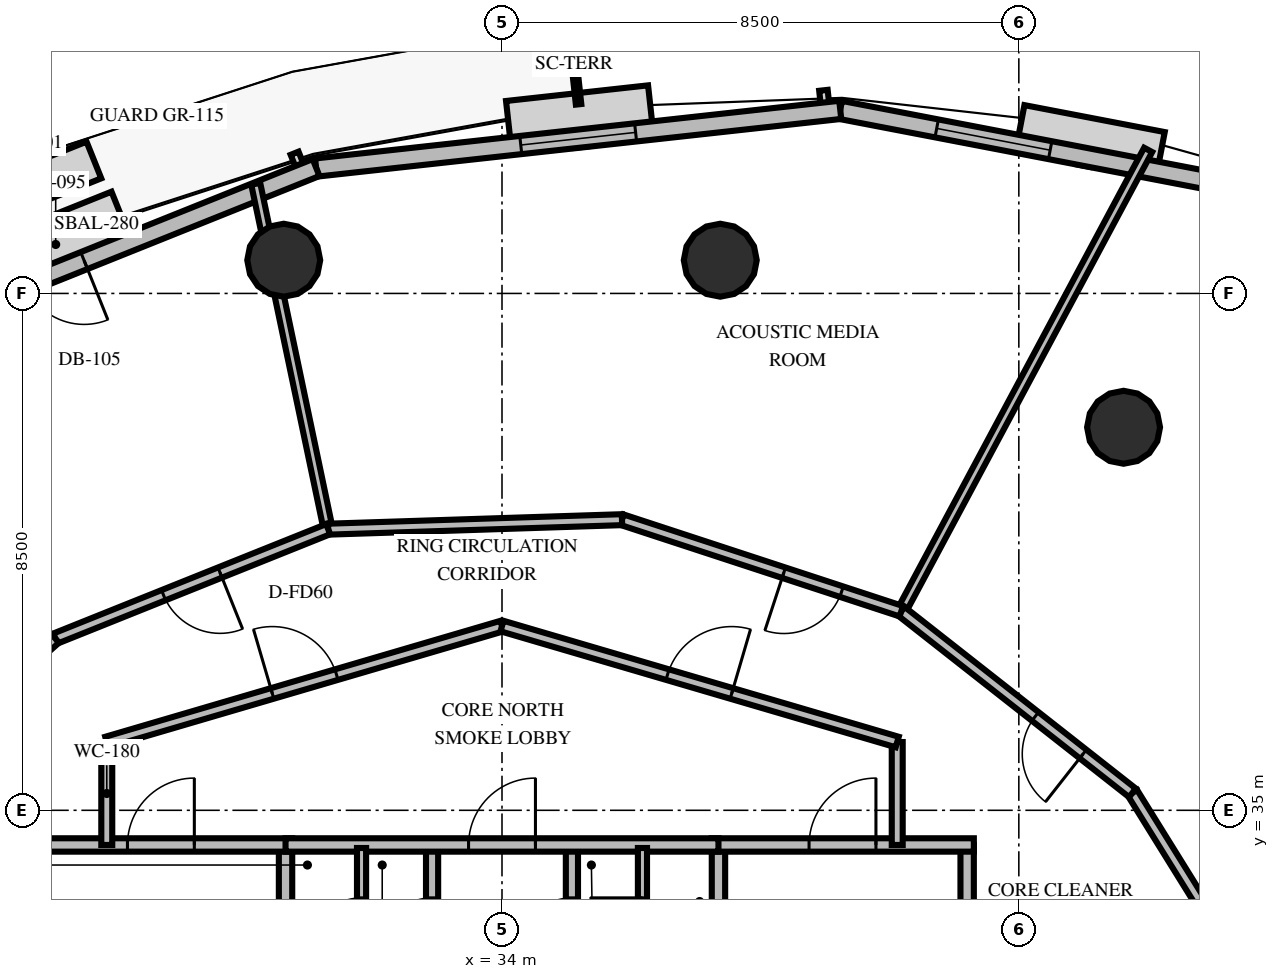
"""IFC4 building model, lengths in metres.
Left out: names, types, materials, properties, quantities, classifications, styles, units other than length and angle.
Written with IfcOpenShell. Run it as: python <this file> out.ifc"""

import sys

from ifc_helpers import new_model, si_unit, direction, frame, frame_2d, origin, origin_2d, place, context, subcontext, project, spatial, rectangle, circle, extrude, element, fill, save


model = new_model("IFC4")
c1 = context("Model", 3, precision=1e-05, world=origin(), true_north=direction((0.0, 1.0)))
c2 = subcontext(c1, "Body", "Model", "MODEL_VIEW")
j1 = project(units=[si_unit("LENGTHUNIT", "METRE"), si_unit("PLANEANGLEUNIT", "RADIAN")], contexts=[c1])
p1 = place(None, origin())
s1 = spatial("IfcSite", under=j1, at=p1, CompositionType="ELEMENT")
p2 = place(p1, origin())
s2 = spatial("IfcBuilding", under=s1, at=p2, CompositionType="ELEMENT")
p3 = place(p2, frame((0.0, 0.0, 125.8)))
s3 = spatial("IfcBuildingStorey", under=s2, at=p3, CompositionType="ELEMENT", Elevation=125.8)
for number, where, z_axis, x_axis in (
    (1, (44.222, 41.299, 0.0), (0.0, 0.0, 1.0), (1.0, 0.0, 0.0)),
    (2, (37.59, 44.046, 0.0), (0.0, 0.0, 1.0), (1.0, 0.0, 0.0)),
    (3, (30.41, 44.046, 0.0), (0.0, 0.0, 1.0), (1.0, 0.0, 0.0)),
):
    element("IfcColumn", number, at=place(p3, frame(where, z_axis=z_axis, x_axis=x_axis)), inside=s3, PredefinedType="COLUMN", context=c2, shape_type="SweptSolid", body=[
        extrude(circle(Radius=0.6, at=origin_2d()), origin(), (0.0, 0.0, 1.0), 4.0),
    ])
p4 = place(p3, frame((47.513, 44.992, 0.0), z_axis=(0.0, 0.0, 1.0), x_axis=(-0.982062977667, 0.188553196461, 0.0)))
e4 = element("IfcWall", 4, at=p4, inside=s3, PredefinedType="SOLIDWALL", context=c2, shape_type="SweptSolid", body=[
    extrude(rectangle(XDim=8.095, YDim=0.3, at=frame_2d((4.048, 0.0))), origin(), (0.0, 0.0, 1.0), 2.9),
])
p5 = place(p4, frame((4.58, 0.0, 0.8)))
e5 = element("IfcOpeningElement", 5, at=p5, cuts=e4, PredefinedType="OPENING", context=c2, shape_type="SweptSolid", body=[
    extrude(rectangle(XDim=1.9, YDim=1.95, at=frame_2d((0.95, 0.975))), frame((0.0, 0.16, 0.0), z_axis=(0.0, -1.0, 0.0), x_axis=(1.0, 0.0, 0.0)), (0.0, 0.0, 1.0), 0.32),
])
p6 = place(p3, frame((39.563, 46.519, 0.0), z_axis=(0.0, 0.0, 1.0), x_axis=(-0.99400193871, -0.109362451697, 0.0)))
e6 = element("IfcWall", 6, at=p6, inside=s3, PredefinedType="SOLIDWALL", context=c2, shape_type="SweptSolid", body=[
    extrude(rectangle(XDim=8.673, YDim=0.3, at=frame_2d((4.336, 0.0))), origin(), (0.0, 0.0, 1.0), 2.9),
])
p7 = place(p6, frame((3.386, 0.0, 0.8)))
e7 = element("IfcOpeningElement", 7, at=p7, cuts=e6, PredefinedType="OPENING", context=c2, shape_type="SweptSolid", body=[
    extrude(rectangle(XDim=1.9, YDim=1.95, at=frame_2d((0.95, 0.975))), frame((0.0, 0.16, 0.0), z_axis=(0.0, -1.0, 0.0), x_axis=(1.0, 0.0, 0.0)), (0.0, 0.0, 1.0), 0.32),
])
p8 = place(p3, frame((30.942, 45.57, 0.0), z_axis=(0.0, 0.0, 1.0), x_axis=(-0.928154394982, -0.372195404426, 0.0)))
e8 = element("IfcWall", 8, at=p8, inside=s3, PredefinedType="SOLIDWALL", context=c2, shape_type="SweptSolid", body=[
    extrude(rectangle(XDim=8.891, YDim=0.3, at=frame_2d((4.445, 0.0))), origin(), (0.0, 0.0, 1.0), 2.9),
])
p9 = place(p8, frame((4.11, 0.0, 0.0)))
e9 = element("IfcOpeningElement", 9, at=p9, cuts=e8, PredefinedType="OPENING", context=c2, shape_type="SweptSolid", body=[
    extrude(rectangle(XDim=1.05, YDim=2.15, at=frame_2d((0.525, 1.075))), frame((0.0, 0.16, 0.0), z_axis=(0.0, -1.0, 0.0), x_axis=(1.0, 0.0, 0.0)), (0.0, 0.0, 1.0), 0.32),
])
p10 = place(p3, frame((30.44, 30.05, 0.0), z_axis=(0.0, 0.0, 1.0), x_axis=(0.0, 1.0, 0.0)))
e10 = element("IfcWall", 10, at=p10, inside=s3, PredefinedType="SOLIDWALL", context=c2, shape_type="SweptSolid", body=[
    extrude(rectangle(XDim=4.38, YDim=0.22, at=frame_2d((2.19, 0.0))), origin(), (0.0, 0.0, 1.0), 2.8),
])
p11 = place(p10, frame((0.8, 0.0, 0.0)))
e11 = element("IfcOpeningElement", 11, at=p11, cuts=e10, PredefinedType="OPENING", context=c2, shape_type="SweptSolid", body=[
    extrude(rectangle(XDim=1.05, YDim=2.1, at=frame_2d((0.525, 1.05))), frame((0.0, 0.12, 0.0), z_axis=(0.0, -1.0, 0.0), x_axis=(1.0, 0.0, 0.0)), (0.0, 0.0, 1.0), 0.24),
])
p12 = place(p3, frame((26.24, 34.43, 0.0), z_axis=(0.0, 0.0, 1.0), x_axis=(1.0, 0.0, 0.0)))
e12 = element("IfcWall", 12, at=p12, inside=s3, PredefinedType="SOLIDWALL", context=c2, shape_type="SweptSolid", body=[
    extrude(rectangle(XDim=4.31, YDim=0.22, at=frame_2d((2.155, 0.0))), origin(), (0.0, 0.0, 1.0), 2.8),
])
p13 = place(p12, frame((1.6, 0.0, 0.0)))
e13 = element("IfcOpeningElement", 13, at=p13, cuts=e12, PredefinedType="OPENING", context=c2, shape_type="SweptSolid", body=[
    extrude(rectangle(XDim=1.1, YDim=2.15, at=frame_2d((0.55, 1.075))), frame((0.0, 0.12, 0.0), z_axis=(0.0, -1.0, 0.0), x_axis=(1.0, 0.0, 0.0)), (0.0, 0.0, 1.0), 0.24),
])
p14 = place(p3, frame((32.85, 30.05, 0.0), z_axis=(0.0, 0.0, 1.0), x_axis=(0.0, 1.0, 0.0)))
e14 = element("IfcWall", 14, at=p14, inside=s3, PredefinedType="SOLIDWALL", context=c2, shape_type="SweptSolid", body=[
    extrude(rectangle(XDim=4.38, YDim=0.2, at=frame_2d((2.19, 0.0))), origin(), (0.0, 0.0, 1.0), 2.8),
])
p15 = place(p14, frame((2.65, 0.0, 0.0)))
e15 = element("IfcOpeningElement", 15, at=p15, cuts=e14, PredefinedType="OPENING", context=c2, shape_type="SweptSolid", body=[
    extrude(rectangle(XDim=0.86, YDim=2.05, at=frame_2d((0.43, 1.025))), frame((0.0, 0.11, 0.0), z_axis=(0.0, -1.0, 0.0), x_axis=(1.0, 0.0, 0.0)), (0.0, 0.0, 1.0), 0.22),
])
p16 = place(p3, frame((37.56, 30.05, 0.0), z_axis=(0.0, 0.0, 1.0), x_axis=(0.0, 1.0, 0.0)))
e16 = element("IfcWall", 16, at=p16, inside=s3, PredefinedType="SOLIDWALL", context=c2, shape_type="SweptSolid", body=[
    extrude(rectangle(XDim=4.38, YDim=0.22, at=frame_2d((2.19, 0.0))), origin(), (0.0, 0.0, 1.0), 2.8),
])
p17 = place(p16, frame((0.8, 0.0, 0.0)))
e17 = element("IfcOpeningElement", 17, at=p17, cuts=e16, PredefinedType="OPENING", context=c2, shape_type="SweptSolid", body=[
    extrude(rectangle(XDim=1.05, YDim=2.1, at=frame_2d((0.525, 1.05))), frame((0.0, 0.12, 0.0), z_axis=(0.0, -1.0, 0.0), x_axis=(1.0, 0.0, 0.0)), (0.0, 0.0, 1.0), 0.24),
])
p18 = place(p3, frame((41.65, 30.05, 0.0), z_axis=(0.0, 0.0, 1.0), x_axis=(0.0, 1.0, 0.0)))
e18 = element("IfcWall", 18, at=p18, inside=s3, PredefinedType="SOLIDWALL", context=c2, shape_type="SweptSolid", body=[
    extrude(rectangle(XDim=4.38, YDim=0.22, at=frame_2d((2.19, 0.0))), origin(), (0.0, 0.0, 1.0), 2.8),
])
p19 = place(p3, frame((37.45, 34.43, 0.0), z_axis=(0.0, 0.0, 1.0), x_axis=(1.0, 0.0, 0.0)))
e19 = element("IfcWall", 19, at=p19, inside=s3, PredefinedType="SOLIDWALL", context=c2, shape_type="SweptSolid", body=[
    extrude(rectangle(XDim=4.31, YDim=0.22, at=frame_2d((2.155, 0.0))), origin(), (0.0, 0.0, 1.0), 2.8),
])
p20 = place(p19, frame((1.6, 0.0, 0.0)))
e20 = element("IfcOpeningElement", 20, at=p20, cuts=e19, PredefinedType="OPENING", context=c2, shape_type="SweptSolid", body=[
    extrude(rectangle(XDim=1.1, YDim=2.15, at=frame_2d((0.55, 1.075))), frame((0.0, 0.12, 0.0), z_axis=(0.0, -1.0, 0.0), x_axis=(1.0, 0.0, 0.0)), (0.0, 0.0, 1.0), 0.24),
])
p21 = place(p3, frame((35.15, 30.05, 0.0), z_axis=(0.0, 0.0, 1.0), x_axis=(0.0, 1.0, 0.0)))
e21 = element("IfcWall", 21, at=p21, inside=s3, PredefinedType="SOLIDWALL", context=c2, shape_type="SweptSolid", body=[
    extrude(rectangle(XDim=4.38, YDim=0.2, at=frame_2d((2.19, 0.0))), origin(), (0.0, 0.0, 1.0), 2.8),
])
p22 = place(p21, frame((2.65, 0.0, 0.0)))
e22 = element("IfcOpeningElement", 22, at=p22, cuts=e21, PredefinedType="OPENING", context=c2, shape_type="SweptSolid", body=[
    extrude(rectangle(XDim=0.86, YDim=2.05, at=frame_2d((0.43, 1.025))), frame((0.0, 0.11, 0.0), z_axis=(0.0, -1.0, 0.0), x_axis=(1.0, 0.0, 0.0)), (0.0, 0.0, 1.0), 0.22),
])
p23 = place(p3, frame((30.44, 34.43, 0.0), z_axis=(0.0, 0.0, 1.0), x_axis=(1.0, 0.0, 0.0)))
e23 = element("IfcWall", 23, at=p23, inside=s3, PredefinedType="SOLIDWALL", context=c2, shape_type="SweptSolid", body=[
    extrude(rectangle(XDim=7.12, YDim=0.22, at=frame_2d((3.56, 0.0))), origin(), (0.0, 0.0, 1.0), 2.8),
])
p24 = place(p23, frame((3.01, 0.0, 0.0)))
e24 = element("IfcOpeningElement", 24, at=p24, cuts=e23, PredefinedType="OPENING", context=c2, shape_type="SweptSolid", body=[
    extrude(rectangle(XDim=1.1, YDim=2.15, at=frame_2d((0.55, 1.075))), frame((0.0, 0.12, 0.0), z_axis=(0.0, -1.0, 0.0), x_axis=(1.0, 0.0, 0.0)), (0.0, 0.0, 1.0), 0.24),
])
p25 = place(p3, frame((31.69, 32.05, 0.0), z_axis=(0.0, 0.0, 1.0), x_axis=(0.0, 1.0, 0.0)))
e25 = element("IfcWall", 25, at=p25, inside=s3, PredefinedType="PARTITIONING", context=c2, shape_type="SweptSolid", body=[
    extrude(rectangle(XDim=2.33, YDim=0.15, at=frame_2d((1.165, 0.0))), origin(), (0.0, 0.0, 1.0), 2.8),
])
p26 = place(p25, frame((0.65, 0.0, 0.0)))
e26 = element("IfcOpeningElement", 26, at=p26, cuts=e25, PredefinedType="OPENING", context=c2, shape_type="SweptSolid", body=[
    extrude(rectangle(XDim=0.86, YDim=2.05, at=frame_2d((0.43, 1.025))), frame((0.0, 0.085, 0.0), z_axis=(0.0, -1.0, 0.0), x_axis=(1.0, 0.0, 0.0)), (0.0, 0.0, 1.0), 0.17),
])
p27 = place(p3, frame((36.31, 32.05, 0.0), z_axis=(0.0, 0.0, 1.0), x_axis=(0.0, 1.0, 0.0)))
e27 = element("IfcWall", 27, at=p27, inside=s3, PredefinedType="PARTITIONING", context=c2, shape_type="SweptSolid", body=[
    extrude(rectangle(XDim=2.33, YDim=0.15, at=frame_2d((1.165, 0.0))), origin(), (0.0, 0.0, 1.0), 2.8),
])
p28 = place(p27, frame((0.65, 0.0, 0.0)))
e28 = element("IfcOpeningElement", 28, at=p28, cuts=e27, PredefinedType="OPENING", context=c2, shape_type="SweptSolid", body=[
    extrude(rectangle(XDim=0.86, YDim=2.05, at=frame_2d((0.43, 1.025))), frame((0.0, 0.085, 0.0), z_axis=(0.0, -1.0, 0.0), x_axis=(1.0, 0.0, 0.0)), (0.0, 0.0, 1.0), 0.17),
])
for number, where, z_axis, x_axis in (
    (29, (27.5, 34.43, 0.0), (0.0, 0.0, 1.0), (0.0, 1.0, 0.0)),
    (30, (40.5, 36.123, 0.0), (0.0, 0.0, 1.0), (0.0, -1.0, 0.0)),
):
    element("IfcWall", number, at=place(p3, frame(where, z_axis=z_axis, x_axis=x_axis)), inside=s3, PredefinedType="PARTITIONING", context=c2, shape_type="SweptSolid", body=[
        extrude(rectangle(XDim=1.693, YDim=0.18, at=frame_2d((0.846, 0.0))), origin(), (0.0, 0.0, 1.0), 2.8),
    ])
p29 = place(p3, frame((27.5, 36.123, 0.0), z_axis=(0.0, 0.0, 1.0), x_axis=(0.959546654541, 0.281549671923, 0.0)))
e31 = element("IfcWall", 31, at=p29, inside=s3, PredefinedType="PARTITIONING", context=c2, shape_type="SweptSolid", body=[
    extrude(rectangle(XDim=6.774, YDim=0.18, at=frame_2d((3.387, 0.0))), origin(), (0.0, 0.0, 1.0), 2.8),
])
p30 = place(p29, frame((2.837, 0.0, 0.0)))
e32 = element("IfcOpeningElement", 32, at=p30, cuts=e31, PredefinedType="OPENING", context=c2, shape_type="SweptSolid", body=[
    extrude(rectangle(XDim=1.1, YDim=2.15, at=frame_2d((0.55, 1.075))), frame((0.0, 0.1, 0.0), z_axis=(0.0, -1.0, 0.0), x_axis=(1.0, 0.0, 0.0)), (0.0, 0.0, 1.0), 0.2),
])
p31 = place(p3, frame((34.0, 38.03, 0.0), z_axis=(0.0, 0.0, 1.0), x_axis=(0.959546654541, -0.281549671923, 0.0)))
e33 = element("IfcWall", 33, at=p31, inside=s3, PredefinedType="PARTITIONING", context=c2, shape_type="SweptSolid", body=[
    extrude(rectangle(XDim=6.774, YDim=0.18, at=frame_2d((3.387, 0.0))), origin(), (0.0, 0.0, 1.0), 2.8),
])
p32 = place(p31, frame((2.837, 0.0, 0.0)))
e34 = element("IfcOpeningElement", 34, at=p32, cuts=e33, PredefinedType="OPENING", context=c2, shape_type="SweptSolid", body=[
    extrude(rectangle(XDim=1.1, YDim=2.15, at=frame_2d((0.55, 1.075))), frame((0.0, 0.1, 0.0), z_axis=(0.0, -1.0, 0.0), x_axis=(1.0, 0.0, 0.0)), (0.0, 0.0, 1.0), 0.2),
])
p33 = place(p3, frame((40.567, 38.273, 0.0), z_axis=(0.0, 0.0, 1.0), x_axis=(0.471771783587, 0.881720695125, 0.0)))
e35 = element("IfcWall", 35, at=p33, inside=s3, PredefinedType="PARTITIONING", context=c2, shape_type="SweptSolid", body=[
    extrude(rectangle(XDim=8.605, YDim=0.15, at=frame_2d((4.302, 0.0))), origin(), (0.0, 0.0, 1.0), 2.8),
])
p34 = place(p3, frame((46.92, 31.181, 0.0), z_axis=(0.0, 0.0, 1.0), x_axis=(-0.527690930955, 0.849436449293, 0.0)))
e36 = element("IfcWall", 36, at=p34, inside=s3, PredefinedType="PARTITIONING", context=c2, shape_type="SweptSolid", body=[
    extrude(rectangle(XDim=4.834, YDim=0.18, at=frame_2d((2.417, 0.0))), origin(), (0.0, 0.0, 1.0), 2.8),
])
p35 = place(p3, frame((44.369, 35.287, 0.0), z_axis=(0.0, 0.0, 1.0), x_axis=(-0.786395437725, 0.617723413451, 0.0)))
e37 = element("IfcWall", 37, at=p35, inside=s3, PredefinedType="PARTITIONING", context=c2, shape_type="SweptSolid", body=[
    extrude(rectangle(XDim=4.834, YDim=0.18, at=frame_2d((2.417, 0.0))), origin(), (0.0, 0.0, 1.0), 2.8),
])
p36 = place(p35, frame((1.034, 0.0, 0.0)))
e38 = element("IfcOpeningElement", 38, at=p36, cuts=e37, PredefinedType="OPENING", context=c2, shape_type="SweptSolid", body=[
    extrude(rectangle(XDim=1.0, YDim=2.15, at=frame_2d((0.5, 1.075))), frame((0.0, 0.1, 0.0), z_axis=(0.0, -1.0, 0.0), x_axis=(1.0, 0.0, 0.0)), (0.0, 0.0, 1.0), 0.2),
])
p37 = place(p3, frame((31.142, 39.623, 0.0), z_axis=(0.0, 0.0, 1.0), x_axis=(-0.205378628845, 0.978682593497, 0.0)))
e39 = element("IfcWall", 39, at=p37, inside=s3, PredefinedType="PARTITIONING", context=c2, shape_type="SweptSolid", body=[
    extrude(rectangle(XDim=5.803, YDim=0.15, at=frame_2d((2.902, 0.0))), origin(), (0.0, 0.0, 1.0), 2.8),
])
p38 = place(p3, frame((40.567, 38.273, 0.0), z_axis=(0.0, 0.0, 1.0), x_axis=(-0.950247186379, 0.311496845535, 0.0)))
e40 = element("IfcWall", 40, at=p38, inside=s3, PredefinedType="PARTITIONING", context=c2, shape_type="SweptSolid", body=[
    extrude(rectangle(XDim=4.834, YDim=0.18, at=frame_2d((2.417, 0.0))), origin(), (0.0, 0.0, 1.0), 2.8),
])
p39 = place(p38, frame((1.034, 0.0, 0.0)))
e41 = element("IfcOpeningElement", 41, at=p39, cuts=e40, PredefinedType="OPENING", context=c2, shape_type="SweptSolid", body=[
    extrude(rectangle(XDim=1.0, YDim=2.15, at=frame_2d((0.5, 1.075))), frame((0.0, 0.1, 0.0), z_axis=(0.0, -1.0, 0.0), x_axis=(1.0, 0.0, 0.0)), (0.0, 0.0, 1.0), 0.2),
])
p40 = place(p3, frame((35.973, 39.779, 0.0), z_axis=(0.0, 0.0, 1.0), x_axis=(-0.999479168972, -0.032270587084, 0.0)))
e42 = element("IfcWall", 42, at=p40, inside=s3, PredefinedType="PARTITIONING", context=c2, shape_type="SweptSolid", body=[
    extrude(rectangle(XDim=4.834, YDim=0.18, at=frame_2d((2.417, 0.0))), origin(), (0.0, 0.0, 1.0), 2.8),
])
p41 = place(p3, frame((31.142, 39.623, 0.0), z_axis=(0.0, 0.0, 1.0), x_axis=(-0.928173370801, -0.372148080387, 0.0)))
e43 = element("IfcWall", 43, at=p41, inside=s3, PredefinedType="PARTITIONING", context=c2, shape_type="SweptSolid", body=[
    extrude(rectangle(XDim=4.834, YDim=0.18, at=frame_2d((2.417, 0.0))), origin(), (0.0, 0.0, 1.0), 2.8),
])
p42 = place(p41, frame((1.917, 0.0, 0.0)))
e44 = element("IfcOpeningElement", 44, at=p42, cuts=e43, PredefinedType="OPENING", context=c2, shape_type="SweptSolid", body=[
    extrude(rectangle(XDim=1.0, YDim=2.15, at=frame_2d((0.5, 1.075))), frame((0.0, 0.1, 0.0), z_axis=(0.0, -1.0, 0.0), x_axis=(1.0, 0.0, 0.0)), (0.0, 0.0, 1.0), 0.2),
])
p43 = place(p3, frame((26.655, 37.824, 0.0), z_axis=(0.0, 0.0, 1.0), x_axis=(-0.744874027172, -0.66720512861, 0.0)))
e45 = element("IfcWall", 45, at=p43, inside=s3, PredefinedType="PARTITIONING", context=c2, shape_type="SweptSolid", body=[
    extrude(rectangle(XDim=4.834, YDim=0.18, at=frame_2d((2.417, 0.0))), origin(), (0.0, 0.0, 1.0), 2.8),
])
p44 = place(p5, origin())
e46 = element("IfcWindow", 46, at=p44, inside=s3, PartitioningType="SINGLE_PANEL", PredefinedType="WINDOW", context=c2, shape_type="SweptSolid", body=[
    extrude(rectangle(XDim=1.9, YDim=1.95, at=frame_2d((0.95, 0.975))), frame((0.0, 0.03, 0.0), z_axis=(0.0, -1.0, 0.0), x_axis=(1.0, 0.0, 0.0)), (0.0, 0.0, 1.0), 0.06),
])
fill(e5, e46)
p45 = place(p7, origin())
e47 = element("IfcWindow", 47, at=p45, inside=s3, PartitioningType="SINGLE_PANEL", PredefinedType="WINDOW", context=c2, shape_type="SweptSolid", body=[
    extrude(rectangle(XDim=1.9, YDim=1.95, at=frame_2d((0.95, 0.975))), frame((0.0, 0.03, 0.0), z_axis=(0.0, -1.0, 0.0), x_axis=(1.0, 0.0, 0.0)), (0.0, 0.0, 1.0), 0.06),
])
fill(e7, e47)
p46 = place(p9, origin())
e48 = element("IfcDoor", 48, at=p46, inside=s3, OperationType="SINGLE_SWING_LEFT", PredefinedType="DOOR", context=c2, shape_type="SweptSolid", body=[
    extrude(rectangle(XDim=1.05, YDim=2.15, at=frame_2d((0.525, 1.075))), frame((0.0, 0.025, 0.0), z_axis=(0.0, -1.0, 0.0), x_axis=(1.0, 0.0, 0.0)), (0.0, 0.0, 1.0), 0.05),
])
fill(e9, e48)
p47 = place(p13, origin())
e49 = element("IfcDoor", 49, at=p47, inside=s3, OperationType="SINGLE_SWING_RIGHT", PredefinedType="DOOR", context=c2, shape_type="SweptSolid", body=[
    extrude(rectangle(XDim=1.1, YDim=2.15, at=frame_2d((0.55, 1.075))), frame((0.0, 0.025, 0.0), z_axis=(0.0, -1.0, 0.0), x_axis=(1.0, 0.0, 0.0)), (0.0, 0.0, 1.0), 0.05),
])
fill(e13, e49)
p48 = place(p15, origin())
e50 = element("IfcDoor", 50, at=p48, inside=s3, OperationType="SINGLE_SWING_LEFT", PredefinedType="TRAPDOOR", context=c2, shape_type="SweptSolid", body=[
    extrude(rectangle(XDim=0.86, YDim=2.05, at=frame_2d((0.43, 1.025))), frame((0.0, 0.025, 0.0), z_axis=(0.0, -1.0, 0.0), x_axis=(1.0, 0.0, 0.0)), (0.0, 0.0, 1.0), 0.05),
])
fill(e15, e50)
p49 = place(p20, origin())
e51 = element("IfcDoor", 51, at=p49, inside=s3, OperationType="SINGLE_SWING_RIGHT", PredefinedType="DOOR", context=c2, shape_type="SweptSolid", body=[
    extrude(rectangle(XDim=1.1, YDim=2.15, at=frame_2d((0.55, 1.075))), frame((0.0, 0.025, 0.0), z_axis=(0.0, -1.0, 0.0), x_axis=(1.0, 0.0, 0.0)), (0.0, 0.0, 1.0), 0.05),
])
fill(e20, e51)
p50 = place(p22, origin())
e52 = element("IfcDoor", 52, at=p50, inside=s3, OperationType="SINGLE_SWING_LEFT", PredefinedType="TRAPDOOR", context=c2, shape_type="SweptSolid", body=[
    extrude(rectangle(XDim=0.86, YDim=2.05, at=frame_2d((0.43, 1.025))), frame((0.0, 0.025, 0.0), z_axis=(0.0, -1.0, 0.0), x_axis=(1.0, 0.0, 0.0)), (0.0, 0.0, 1.0), 0.05),
])
fill(e22, e52)
p51 = place(p24, origin())
e53 = element("IfcDoor", 53, at=p51, inside=s3, OperationType="SINGLE_SWING_RIGHT", PredefinedType="DOOR", context=c2, shape_type="SweptSolid", body=[
    extrude(rectangle(XDim=1.1, YDim=2.15, at=frame_2d((0.55, 1.075))), frame((0.0, 0.025, 0.0), z_axis=(0.0, -1.0, 0.0), x_axis=(1.0, 0.0, 0.0)), (0.0, 0.0, 1.0), 0.05),
])
fill(e24, e53)
p52 = place(p26, origin())
e54 = element("IfcDoor", 54, at=p52, inside=s3, OperationType="SINGLE_SWING_LEFT", PredefinedType="TRAPDOOR", context=c2, shape_type="SweptSolid", body=[
    extrude(rectangle(XDim=0.86, YDim=2.05, at=frame_2d((0.43, 1.025))), frame((0.0, 0.025, 0.0), z_axis=(0.0, -1.0, 0.0), x_axis=(1.0, 0.0, 0.0)), (0.0, 0.0, 1.0), 0.05),
])
fill(e26, e54)
p53 = place(p28, origin())
e55 = element("IfcDoor", 55, at=p53, inside=s3, OperationType="SINGLE_SWING_RIGHT", PredefinedType="TRAPDOOR", context=c2, shape_type="SweptSolid", body=[
    extrude(rectangle(XDim=0.86, YDim=2.05, at=frame_2d((0.43, 1.025))), frame((0.0, 0.025, 0.0), z_axis=(0.0, -1.0, 0.0), x_axis=(1.0, 0.0, 0.0)), (0.0, 0.0, 1.0), 0.05),
])
fill(e28, e55)
p54 = place(p30, origin())
e56 = element("IfcDoor", 56, at=p54, inside=s3, OperationType="SINGLE_SWING_LEFT", PredefinedType="DOOR", context=c2, shape_type="SweptSolid", body=[
    extrude(rectangle(XDim=1.1, YDim=2.15, at=frame_2d((0.55, 1.075))), frame((0.0, 0.025, 0.0), z_axis=(0.0, -1.0, 0.0), x_axis=(1.0, 0.0, 0.0)), (0.0, 0.0, 1.0), 0.05),
])
fill(e32, e56)
p55 = place(p32, origin())
e57 = element("IfcDoor", 57, at=p55, inside=s3, OperationType="SINGLE_SWING_RIGHT", PredefinedType="DOOR", context=c2, shape_type="SweptSolid", body=[
    extrude(rectangle(XDim=1.1, YDim=2.15, at=frame_2d((0.55, 1.075))), frame((0.0, 0.025, 0.0), z_axis=(0.0, -1.0, 0.0), x_axis=(1.0, 0.0, 0.0)), (0.0, 0.0, 1.0), 0.05),
])
fill(e34, e57)
p56 = place(p36, origin())
e58 = element("IfcDoor", 58, at=p56, inside=s3, OperationType="SINGLE_SWING_LEFT", PredefinedType="DOOR", context=c2, shape_type="SweptSolid", body=[
    extrude(rectangle(XDim=1.0, YDim=2.15, at=frame_2d((0.5, 1.075))), frame((0.0, 0.025, 0.0), z_axis=(0.0, -1.0, 0.0), x_axis=(1.0, 0.0, 0.0)), (0.0, 0.0, 1.0), 0.05),
])
fill(e38, e58)
p57 = place(p39, origin())
e59 = element("IfcDoor", 59, at=p57, inside=s3, OperationType="SINGLE_SWING_RIGHT", PredefinedType="DOOR", context=c2, shape_type="SweptSolid", body=[
    extrude(rectangle(XDim=1.0, YDim=2.15, at=frame_2d((0.5, 1.075))), frame((0.0, 0.025, 0.0), z_axis=(0.0, -1.0, 0.0), x_axis=(1.0, 0.0, 0.0)), (0.0, 0.0, 1.0), 0.05),
])
fill(e41, e59)
p58 = place(p42, origin())
e60 = element("IfcDoor", 60, at=p58, inside=s3, OperationType="SINGLE_SWING_LEFT", PredefinedType="DOOR", context=c2, shape_type="SweptSolid", body=[
    extrude(rectangle(XDim=1.0, YDim=2.15, at=frame_2d((0.5, 1.075))), frame((0.0, 0.025, 0.0), z_axis=(0.0, -1.0, 0.0), x_axis=(1.0, 0.0, 0.0)), (0.0, 0.0, 1.0), 0.05),
])
fill(e44, e60)
save(model, sys.argv[1])
